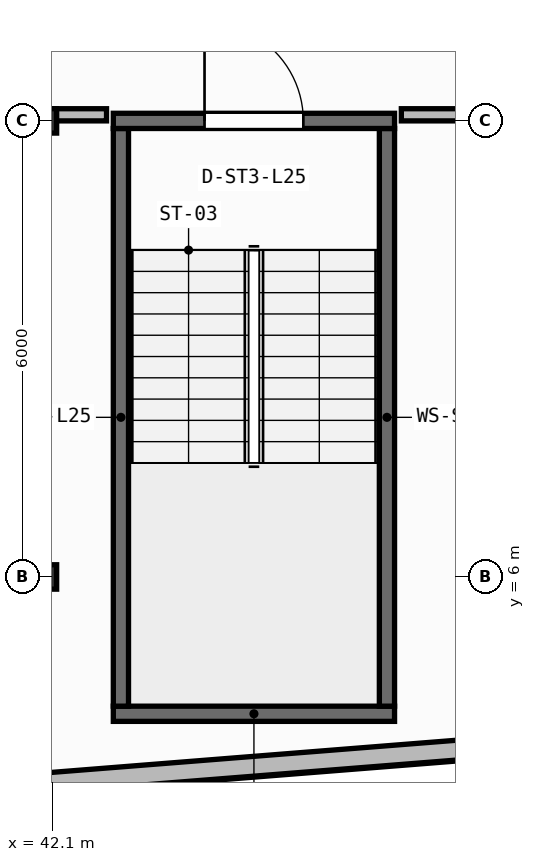
"""IFC4 building model, lengths in metres.
Left out: names, types, materials, properties, quantities, classifications, styles, units other than length and angle.
Written with IfcOpenShell. Run it as: python <this file> out.ifc"""

import sys

from ifc_helpers import new_model, si_unit, direction, frame, frame_2d, origin, origin_2d, place, context, subcontext, project, spatial, rectangle, i_section, extrude, element, fill, save


model = new_model("IFC4")
c1 = context("Model", 3, precision=1e-05, world=origin(), true_north=direction((0.0, 1.0)))
c2 = subcontext(c1, "Body", "Model", "MODEL_VIEW")
j1 = project(units=[si_unit("LENGTHUNIT", "METRE"), si_unit("PLANEANGLEUNIT", "RADIAN")], contexts=[c1])
p1 = place(None, origin())
s1 = spatial("IfcSite", under=j1, at=p1, CompositionType="ELEMENT")
p2 = place(p1, origin())
s2 = spatial("IfcBuilding", under=s1, at=p2, CompositionType="ELEMENT")
p3 = place(p2, frame((0.0, 0.0, 103.35)))
s3 = spatial("IfcBuildingStorey", under=s2, at=p3, CompositionType="ELEMENT", Elevation=103.35)
for number, where, z_axis, x_axis in (
    (1, (42.0, 6.0, 0.0), (0.0, 0.0, 1.0), (1.0, 0.0, 0.0)),
    (2, (42.0, 12.0, 0.0), (0.0, 0.0, 1.0), (1.0, 0.0, 0.0)),
):
    element("IfcColumn", number, at=place(p3, frame(where, z_axis=z_axis, x_axis=x_axis)), inside=s3, PredefinedType="COLUMN", context=c2, shape_type="SweptSolid", body=[
        extrude(i_section(OverallWidth=0.309, OverallDepth=0.321, WebThickness=0.014, FlangeThickness=0.022, FilletRadius=0.017, at=origin_2d()), origin(), (0.0, 0.0, 1.0), 3.95),
    ])
p4 = place(p3, frame((2.76, 0.173, 0.0), z_axis=(0.0, 0.0, 1.0), x_axis=(0.996857931723, 0.079210251617, 0.0)))
e3 = element("IfcWall", 3, at=p4, inside=s3, PredefinedType="STANDARD", context=c2, shape_type="SweptSolid", body=[
    extrude(rectangle(XDim=51.442, YDim=0.26, at=frame_2d((25.721, 0.0))), origin(), (0.0, 0.0, 1.0), 3.71),
])
p5 = place(p4, frame((24.521, 0.0, 0.9)))
e4 = element("IfcOpeningElement", 4, at=p5, cuts=e3, PredefinedType="OPENING", context=c2, shape_type="SweptSolid", body=[
    extrude(rectangle(XDim=2.4, YDim=1.65, at=frame_2d((1.2, 0.825))), frame((0.0, 0.14, 0.0), z_axis=(0.0, -1.0, 0.0), x_axis=(1.0, 0.0, 0.0)), (0.0, 0.0, 1.0), 0.28),
])
p6 = place(p3, frame((42.9, 4.2, 0.0), z_axis=(0.0, 0.0, 1.0), x_axis=(1.0, 0.0, 0.0)))
e5 = element("IfcWall", 5, at=p6, inside=s3, PredefinedType="SHEAR", context=c2, shape_type="SweptSolid", body=[
    extrude(rectangle(XDim=3.7, YDim=0.2, at=frame_2d((1.85, 0.0))), origin(), (0.0, 0.0, 1.0), 3.71),
])
for number, where, z_axis, x_axis in (
    (6, (43.0, 4.3, 0.0), (0.0, 0.0, 1.0), (0.0, 1.0, 0.0)),
    (7, (46.5, 4.3, 0.0), (0.0, 0.0, 1.0), (0.0, 1.0, 0.0)),
):
    element("IfcWall", number, at=place(p3, frame(where, z_axis=z_axis, x_axis=x_axis)), inside=s3, PredefinedType="SHEAR", context=c2, shape_type="SweptSolid", body=[
        extrude(rectangle(XDim=7.6, YDim=0.2, at=frame_2d((3.8, 0.0))), origin(), (0.0, 0.0, 1.0), 3.71),
    ])
p7 = place(p3, frame((42.9, 12.0, 0.0), z_axis=(0.0, 0.0, 1.0), x_axis=(1.0, 0.0, 0.0)))
e8 = element("IfcWall", 8, at=p7, inside=s3, PredefinedType="SHEAR", context=c2, shape_type="SweptSolid", body=[
    extrude(rectangle(XDim=3.7, YDim=0.2, at=frame_2d((1.85, 0.0))), origin(), (0.0, 0.0, 1.0), 3.71),
])
p8 = place(p7, frame((1.2, 0.0, 0.0)))
e9 = element("IfcOpeningElement", 9, at=p8, cuts=e8, PredefinedType="OPENING", context=c2, shape_type="SweptSolid", body=[
    extrude(rectangle(XDim=1.3, YDim=2.15, at=frame_2d((0.65, 1.075))), frame((0.0, 0.11, 0.0), z_axis=(0.0, -1.0, 0.0), x_axis=(1.0, 0.0, 0.0)), (0.0, 0.0, 1.0), 0.22),
])
p9 = place(p3, frame((40.03, 12.08, 0.0), z_axis=(0.0, 0.0, 1.0), x_axis=(1.0, 0.0, 0.0)))
e10 = element("IfcWall", 10, at=p9, inside=s3, PredefinedType="PARTITIONING", context=c2, shape_type="SweptSolid", body=[
    extrude(rectangle(XDim=2.781, YDim=0.16, at=frame_2d((1.39, 0.0))), origin(), (0.0, 0.0, 1.0), 3.083),
])
p10 = place(p3, frame((46.689, 12.08, 0.0), z_axis=(0.0, 0.0, 1.0), x_axis=(1.0, 0.0, 0.0)))
e11 = element("IfcWall", 11, at=p10, inside=s3, PredefinedType="PARTITIONING", context=c2, shape_type="SweptSolid", body=[
    extrude(rectangle(XDim=3.011, YDim=0.16, at=frame_2d((1.505, 0.0))), origin(), (0.0, 0.0, 1.0), 3.083),
])
p11 = place(p8, origin())
e12 = element("IfcDoor", 12, at=p11, inside=s3, OperationType="SINGLE_SWING_LEFT", PredefinedType="DOOR", context=c2, shape_type="SweptSolid", body=[
    extrude(rectangle(XDim=1.3, YDim=2.15, at=frame_2d((0.65, 1.075))), frame((0.0, 0.025, 0.0), z_axis=(0.0, -1.0, 0.0), x_axis=(1.0, 0.0, 0.0)), (0.0, 0.0, 1.0), 0.05),
])
fill(e9, e12)
save(model, sys.argv[1])
